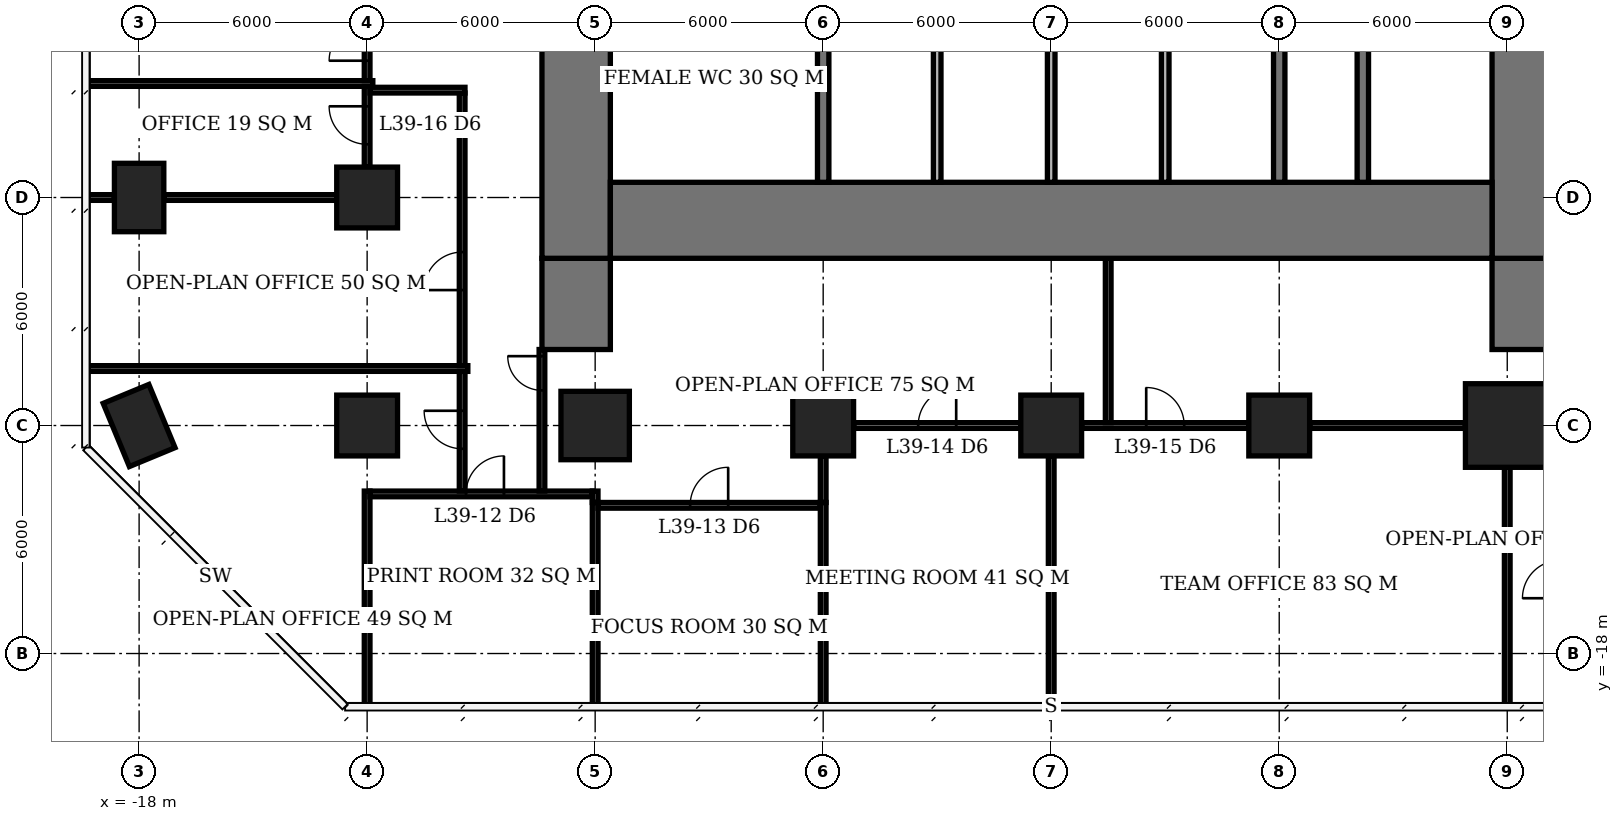
"""IFC4 building model, lengths in metres.
Left out: names, types, materials, properties, quantities, classifications, styles, units other than length and angle.
Written with IfcOpenShell. Run it as: python <this file> out.ifc"""

import sys

from ifc_helpers import new_model, si_unit, direction, frame, frame_2d, origin, origin_2d, place, context, subcontext, project, spatial, rectangle, extrude, element, fill, save


model = new_model("IFC4")
c1 = context("Model", 3, precision=1e-05, world=origin(), true_north=direction((0.0, 1.0)))
c2 = subcontext(c1, "Body", "Model", "MODEL_VIEW")
j1 = project(units=[si_unit("LENGTHUNIT", "METRE"), si_unit("PLANEANGLEUNIT", "RADIAN")], contexts=[c1])
p1 = place(None, origin())
s1 = spatial("IfcSite", under=j1, at=p1, CompositionType="ELEMENT")
p2 = place(p1, origin())
s2 = spatial("IfcBuilding", under=s1, at=p2, CompositionType="ELEMENT")
p3 = place(p2, frame((0.0, 0.0, 160.1)))
s3 = spatial("IfcBuildingStorey", under=s2, at=p3, CompositionType="ELEMENT", Elevation=160.1)
for number, where, z_axis, x_axis in (
    (1, (-18.0, -12.0, 0.0), (0.0, 0.0, 1.0), (-0.383, 0.924, 0.0)),
    (2, (-18.0, -6.0, 0.0), (0.0, 0.0, 1.0), (0.0, 1.0, 0.0)),
):
    element("IfcColumn", number, at=place(p3, frame(where, z_axis=z_axis, x_axis=x_axis)), inside=s3, PredefinedType="COLUMN", context=c2, shape_type="SweptSolid", body=[
        extrude(rectangle(XDim=1.8, YDim=1.3, at=origin_2d()), origin(), (0.0, 0.0, 1.0), 3.9),
    ])
for number, where, z_axis, x_axis in (
    (3, (-12.0, -12.0, 0.0), (0.0, 0.0, 1.0), (1.0, 0.0, 0.0)),
    (4, (-12.0, -6.0, 0.0), (0.0, 0.0, 1.0), (1.0, 0.0, 0.0)),
):
    element("IfcColumn", number, at=place(p3, frame(where, z_axis=z_axis, x_axis=x_axis)), inside=s3, PredefinedType="COLUMN", context=c2, shape_type="SweptSolid", body=[
        extrude(rectangle(XDim=1.6, YDim=1.6, at=origin_2d()), origin(), (0.0, 0.0, 1.0), 3.9),
    ])
p4 = place(p3, frame((-6.0, -12.0, 0.0), z_axis=(0.0, 0.0, 1.0), x_axis=(1.0, 0.0, 0.0)))
e5 = element("IfcColumn", 5, at=p4, inside=s3, PredefinedType="COLUMN", context=c2, shape_type="SweptSolid", body=[
    extrude(rectangle(XDim=1.8, YDim=1.8, at=origin_2d()), origin(), (0.0, 0.0, 1.0), 3.9),
])
for number, where, z_axis, x_axis in (
    (6, (0.0, -12.0, 0.0), (0.0, 0.0, 1.0), (1.0, 0.0, 0.0)),
    (7, (6.0, -12.0, 0.0), (0.0, 0.0, 1.0), (1.0, 0.0, 0.0)),
    (8, (12.0, -12.0, 0.0), (0.0, 0.0, 1.0), (1.0, 0.0, 0.0)),
):
    element("IfcColumn", number, at=place(p3, frame(where, z_axis=z_axis, x_axis=x_axis)), inside=s3, PredefinedType="COLUMN", context=c2, shape_type="SweptSolid", body=[
        extrude(rectangle(XDim=1.6, YDim=1.6, at=origin_2d()), origin(), (0.0, 0.0, 1.0), 3.9),
    ])
p5 = place(p3, frame((18.0, -12.0, 0.0), z_axis=(0.0, 0.0, 1.0), x_axis=(1.0, 0.0, 0.0)))
e9 = element("IfcColumn", 9, at=p5, inside=s3, PredefinedType="COLUMN", context=c2, shape_type="SweptSolid", body=[
    extrude(rectangle(XDim=2.2, YDim=2.2, at=origin_2d()), origin(), (0.0, 0.0, 1.0), 3.9),
])
p6 = place(p3, frame((-5.6, -6.6, 0.0), z_axis=(0.0, 0.0, 1.0), x_axis=(1.0, 0.0, 0.0)))
e10 = element("IfcWall", 10, at=p6, inside=s3, PredefinedType="SHEAR", context=c2, shape_type="SweptSolid", body=[
    extrude(rectangle(XDim=23.2, YDim=2.0, at=frame_2d((11.6, 0.0))), origin(), (0.0, 0.0, 1.0), 3.9),
])
p7 = place(p3, frame((-6.5, -7.6, 0.0), z_axis=(0.0, 0.0, 1.0), x_axis=(0.0, 1.0, 0.0)))
e11 = element("IfcWall", 11, at=p7, inside=s3, PredefinedType="SHEAR", context=c2, shape_type="SweptSolid", body=[
    extrude(rectangle(XDim=21.2, YDim=1.8, at=frame_2d((10.6, 0.0))), origin(), (0.0, 0.0, 1.0), 3.9),
])
p8 = place(p7, frame((7.8, 0.0, 0.0)))
e12 = element("IfcOpeningElement", 12, at=p8, cuts=e11, PredefinedType="OPENING", context=c2, shape_type="SweptSolid", body=[
    extrude(rectangle(XDim=1.8, YDim=2.4, at=frame_2d((0.9, 1.2))), frame((0.0, 0.91, 0.0), z_axis=(0.0, -1.0, 0.0), x_axis=(1.0, 0.0, 0.0)), (0.0, 0.0, 1.0), 1.82),
])
p9 = place(p3, frame((18.5, -7.6, 0.0), z_axis=(0.0, 0.0, 1.0), x_axis=(0.0, 1.0, 0.0)))
e13 = element("IfcWall", 13, at=p9, inside=s3, PredefinedType="SHEAR", context=c2, shape_type="SweptSolid", body=[
    extrude(rectangle(XDim=21.2, YDim=1.8, at=frame_2d((10.6, 0.0))), origin(), (0.0, 0.0, 1.0), 3.9),
])
p10 = place(p9, frame((9.2, 0.0, 0.0)))
e14 = element("IfcOpeningElement", 14, at=p10, cuts=e13, PredefinedType="OPENING", context=c2, shape_type="SweptSolid", body=[
    extrude(rectangle(XDim=1.8, YDim=2.4, at=frame_2d((0.9, 1.2))), frame((0.0, 0.91, 0.0), z_axis=(0.0, -1.0, 0.0), x_axis=(1.0, 0.0, 0.0)), (0.0, 0.0, 1.0), 1.82),
])
for number, where, z_axis, x_axis in (
    (15, (-6.5, -10.0, 0.0), (0.0, 0.0, 1.0), (0.0, 1.0, 0.0)),
    (16, (18.5, -10.0, 0.0), (0.0, 0.0, 1.0), (0.0, 1.0, 0.0)),
):
    element("IfcWall", number, at=place(p3, frame(where, z_axis=z_axis, x_axis=x_axis)), inside=s3, PredefinedType="SHEAR", context=c2, shape_type="SweptSolid", body=[
        extrude(rectangle(XDim=2.4, YDim=1.8, at=frame_2d((1.2, 0.0))), origin(), (0.0, 0.0, 1.0), 3.9),
    ])
for number, where, z_axis, x_axis in (
    (17, (0.0, -5.6, 0.0), (0.0, 0.0, 1.0), (0.0, 1.0, 0.0)),
    (18, (12.0, -5.6, 0.0), (0.0, 0.0, 1.0), (0.0, 1.0, 0.0)),
):
    element("IfcWall", number, at=place(p3, frame(where, z_axis=z_axis, x_axis=x_axis)), inside=s3, PredefinedType="SHEAR", context=c2, shape_type="SweptSolid", body=[
        extrude(rectangle(XDim=5.45, YDim=0.3, at=frame_2d((2.725, 0.0))), origin(), (0.0, 0.0, 1.0), 3.9),
    ])
p11 = place(p3, frame((14.2, -5.6, 0.0), z_axis=(0.0, 0.0, 1.0), x_axis=(0.0, 1.0, 0.0)))
e19 = element("IfcWall", 19, at=p11, inside=s3, PredefinedType="SHEAR", context=c2, shape_type="SweptSolid", body=[
    extrude(rectangle(XDim=8.45, YDim=0.3, at=frame_2d((4.225, 0.0))), origin(), (0.0, 0.0, 1.0), 3.9),
])
for number, where, z_axis, x_axis in (
    (20, (3.0, -5.6, 0.0), (0.0, 0.0, 1.0), (0.0, 1.0, 0.0)),
    (21, (6.0, -5.6, 0.0), (0.0, 0.0, 1.0), (0.0, 1.0, 0.0)),
    (22, (9.0, -5.6, 0.0), (0.0, 0.0, 1.0), (0.0, 1.0, 0.0)),
):
    element("IfcWall", number, at=place(p3, frame(where, z_axis=z_axis, x_axis=x_axis)), inside=s3, PredefinedType="SOLIDWALL", context=c2, shape_type="SweptSolid", body=[
        extrude(rectangle(XDim=5.45, YDim=0.2, at=frame_2d((2.725, 0.0))), origin(), (0.0, 0.0, 1.0), 3.9),
    ])
p12 = place(p3, frame((-5.925, -14.1, 0.0), z_axis=(0.0, 0.0, 1.0), x_axis=(1.0, 0.0, 0.0)))
e23 = element("IfcWall", 23, at=p12, inside=s3, PredefinedType="PARTITIONING", context=c2, shape_type="SweptSolid", body=[
    extrude(rectangle(XDim=5.85, YDim=0.15, at=frame_2d((2.925, 0.0))), origin(), (0.0, 0.0, 1.0), 3.65),
])
p13 = place(p12, frame((2.425, 0.0, 0.0)))
e24 = element("IfcOpeningElement", 24, at=p13, cuts=e23, PredefinedType="OPENING", context=c2, shape_type="SweptSolid", body=[
    extrude(rectangle(XDim=1.0, YDim=2.1, at=frame_2d((0.5, 1.05))), frame((0.0, 0.085, 0.0), z_axis=(0.0, -1.0, 0.0), x_axis=(1.0, 0.0, 0.0)), (0.0, 0.0, 1.0), 0.17),
])
p14 = place(p3, frame((-11.925, -13.8, 0.0), z_axis=(0.0, 0.0, 1.0), x_axis=(1.0, 0.0, 0.0)))
e25 = element("IfcWall", 25, at=p14, inside=s3, PredefinedType="PARTITIONING", context=c2, shape_type="SweptSolid", body=[
    extrude(rectangle(XDim=5.85, YDim=0.15, at=frame_2d((2.925, 0.0))), origin(), (0.0, 0.0, 1.0), 3.65),
])
p15 = place(p14, frame((2.525, 0.0, 0.0)))
e26 = element("IfcOpeningElement", 26, at=p15, cuts=e25, PredefinedType="OPENING", context=c2, shape_type="SweptSolid", body=[
    extrude(rectangle(XDim=1.0, YDim=2.1, at=frame_2d((0.5, 1.05))), frame((0.0, 0.085, 0.0), z_axis=(0.0, -1.0, 0.0), x_axis=(1.0, 0.0, 0.0)), (0.0, 0.0, 1.0), 0.17),
])
p16 = place(p3, frame((0.8, -12.0, 0.0), z_axis=(0.0, 0.0, 1.0), x_axis=(1.0, 0.0, 0.0)))
e27 = element("IfcWall", 27, at=p16, inside=s3, PredefinedType="PARTITIONING", context=c2, shape_type="SweptSolid", body=[
    extrude(rectangle(XDim=4.4, YDim=0.15, at=frame_2d((2.2, 0.0))), origin(), (0.0, 0.0, 1.0), 3.65),
])
p17 = place(p16, frame((1.7, 0.0, 0.0)))
e28 = element("IfcOpeningElement", 28, at=p17, cuts=e27, PredefinedType="OPENING", context=c2, shape_type="SweptSolid", body=[
    extrude(rectangle(XDim=1.0, YDim=2.1, at=frame_2d((0.5, 1.05))), frame((0.0, 0.085, 0.0), z_axis=(0.0, -1.0, 0.0), x_axis=(1.0, 0.0, 0.0)), (0.0, 0.0, 1.0), 0.17),
])
p18 = place(p3, frame((6.8, -12.0, 0.0), z_axis=(0.0, 0.0, 1.0), x_axis=(1.0, 0.0, 0.0)))
e29 = element("IfcWall", 29, at=p18, inside=s3, PredefinedType="PARTITIONING", context=c2, shape_type="SweptSolid", body=[
    extrude(rectangle(XDim=4.4, YDim=0.15, at=frame_2d((2.2, 0.0))), origin(), (0.0, 0.0, 1.0), 3.65),
])
p19 = place(p18, frame((1.7, 0.0, 0.0)))
e30 = element("IfcOpeningElement", 30, at=p19, cuts=e29, PredefinedType="OPENING", context=c2, shape_type="SweptSolid", body=[
    extrude(rectangle(XDim=1.0, YDim=2.1, at=frame_2d((0.5, 1.05))), frame((0.0, 0.085, 0.0), z_axis=(0.0, -1.0, 0.0), x_axis=(1.0, 0.0, 0.0)), (0.0, 0.0, 1.0), 0.17),
])
p20 = place(p3, frame((12.8, -12.0, 0.0), z_axis=(0.0, 0.0, 1.0), x_axis=(1.0, 0.0, 0.0)))
e31 = element("IfcWall", 31, at=p20, inside=s3, PredefinedType="PARTITIONING", context=c2, shape_type="SweptSolid", body=[
    extrude(rectangle(XDim=4.1, YDim=0.15, at=frame_2d((2.05, 0.0))), origin(), (0.0, 0.0, 1.0), 3.65),
])
p21 = place(p3, frame((-19.4, -6.0, 0.0), z_axis=(0.0, 0.0, 1.0), x_axis=(1.0, 0.0, 0.0)))
e32 = element("IfcWall", 32, at=p21, inside=s3, PredefinedType="PARTITIONING", context=c2, shape_type="SweptSolid", body=[
    extrude(rectangle(XDim=0.75, YDim=0.15, at=frame_2d((0.375, 0.0))), origin(), (0.0, 0.0, 1.0), 3.65),
])
p22 = place(p3, frame((-17.35, -6.0, 0.0), z_axis=(0.0, 0.0, 1.0), x_axis=(1.0, 0.0, 0.0)))
e33 = element("IfcWall", 33, at=p22, inside=s3, PredefinedType="PARTITIONING", context=c2, shape_type="SweptSolid", body=[
    extrude(rectangle(XDim=4.55, YDim=0.15, at=frame_2d((2.275, 0.0))), origin(), (0.0, 0.0, 1.0), 3.65),
])
p23 = place(p3, frame((-19.4, -3.0, 0.0), z_axis=(0.0, 0.0, 1.0), x_axis=(1.0, 0.0, 0.0)))
e34 = element("IfcWall", 34, at=p23, inside=s3, PredefinedType="PARTITIONING", context=c2, shape_type="SweptSolid", body=[
    extrude(rectangle(XDim=7.55, YDim=0.15, at=frame_2d((3.775, 0.0))), origin(), (0.0, 0.0, 1.0), 3.65),
])
p24 = place(p3, frame((-12.0, -19.4, 0.0), z_axis=(0.0, 0.0, 1.0), x_axis=(0.0, 1.0, 0.0)))
e35 = element("IfcWall", 35, at=p24, inside=s3, PredefinedType="PARTITIONING", context=c2, shape_type="SweptSolid", body=[
    extrude(rectangle(XDim=5.675, YDim=0.15, at=frame_2d((2.837, 0.0))), origin(), (0.0, 0.0, 1.0), 3.65),
])
p25 = place(p3, frame((-12.0, -5.2, 0.0), z_axis=(0.0, 0.0, 1.0), x_axis=(0.0, 1.0, 0.0)))
e36 = element("IfcWall", 36, at=p25, inside=s3, PredefinedType="PARTITIONING", context=c2, shape_type="SweptSolid", body=[
    extrude(rectangle(XDim=2.125, YDim=0.15, at=frame_2d((1.062, 0.0))), origin(), (0.0, 0.0, 1.0), 3.65),
])
p26 = place(p25, frame((0.6, 0.0, 0.0)))
e37 = element("IfcOpeningElement", 37, at=p26, cuts=e36, PredefinedType="OPENING", context=c2, shape_type="SweptSolid", body=[
    extrude(rectangle(XDim=1.0, YDim=2.1, at=frame_2d((0.5, 1.05))), frame((0.0, 0.085, 0.0), z_axis=(0.0, -1.0, 0.0), x_axis=(1.0, 0.0, 0.0)), (0.0, 0.0, 1.0), 0.17),
])
p27 = place(p3, frame((-12.0, -2.925, 0.0), z_axis=(0.0, 0.0, 1.0), x_axis=(0.0, 1.0, 0.0)))
e38 = element("IfcWall", 38, at=p27, inside=s3, PredefinedType="PARTITIONING", context=c2, shape_type="SweptSolid", body=[
    extrude(rectangle(XDim=2.125, YDim=0.15, at=frame_2d((1.062, 0.0))), origin(), (0.0, 0.0, 1.0), 3.65),
])
p28 = place(p27, frame((0.525, 0.0, 0.0)))
e39 = element("IfcOpeningElement", 39, at=p28, cuts=e38, PredefinedType="OPENING", context=c2, shape_type="SweptSolid", body=[
    extrude(rectangle(XDim=1.0, YDim=2.1, at=frame_2d((0.5, 1.05))), frame((0.0, 0.085, 0.0), z_axis=(0.0, -1.0, 0.0), x_axis=(1.0, 0.0, 0.0)), (0.0, 0.0, 1.0), 0.17),
])
p29 = place(p3, frame((-6.0, -19.4, 0.0), z_axis=(0.0, 0.0, 1.0), x_axis=(0.0, 1.0, 0.0)))
e40 = element("IfcWall", 40, at=p29, inside=s3, PredefinedType="PARTITIONING", context=c2, shape_type="SweptSolid", body=[
    extrude(rectangle(XDim=5.375, YDim=0.15, at=frame_2d((2.688, 0.0))), origin(), (0.0, 0.0, 1.0), 3.65),
])
p30 = place(p3, frame((-6.0, -14.025, 0.0), z_axis=(0.0, 0.0, 1.0), x_axis=(0.0, 1.0, 0.0)))
e41 = element("IfcWall", 41, at=p30, inside=s3, PredefinedType="PARTITIONING", context=c2, shape_type="SweptSolid", body=[
    extrude(rectangle(XDim=0.3, YDim=0.15, at=frame_2d((0.15, 0.0))), origin(), (0.0, 0.0, 1.0), 3.65),
])
p31 = place(p3, frame((0.0, -19.4, 0.0), z_axis=(0.0, 0.0, 1.0), x_axis=(0.0, 1.0, 0.0)))
e42 = element("IfcWall", 42, at=p31, inside=s3, PredefinedType="PARTITIONING", context=c2, shape_type="SweptSolid", body=[
    extrude(rectangle(XDim=5.375, YDim=0.15, at=frame_2d((2.688, 0.0))), origin(), (0.0, 0.0, 1.0), 3.65),
])
p32 = place(p3, frame((0.0, -14.025, 0.0), z_axis=(0.0, 0.0, 1.0), x_axis=(0.0, 1.0, 0.0)))
e43 = element("IfcWall", 43, at=p32, inside=s3, PredefinedType="PARTITIONING", context=c2, shape_type="SweptSolid", body=[
    extrude(rectangle(XDim=1.225, YDim=0.15, at=frame_2d((0.612, 0.0))), origin(), (0.0, 0.0, 1.0), 3.65),
])
p33 = place(p3, frame((6.0, -19.35, 0.0), z_axis=(0.0, 0.0, 1.0), x_axis=(0.0, 1.0, 0.0)))
e44 = element("IfcWall", 44, at=p33, inside=s3, PredefinedType="PARTITIONING", context=c2, shape_type="SweptSolid", body=[
    extrude(rectangle(XDim=6.55, YDim=0.15, at=frame_2d((3.275, 0.0))), origin(), (0.0, 0.0, 1.0), 3.65),
])
p34 = place(p3, frame((18.0, -19.4, 0.0), z_axis=(0.0, 0.0, 1.0), x_axis=(0.0, 1.0, 0.0)))
e45 = element("IfcWall", 45, at=p34, inside=s3, PredefinedType="PARTITIONING", context=c2, shape_type="SweptSolid", body=[
    extrude(rectangle(XDim=6.3, YDim=0.15, at=frame_2d((3.15, 0.0))), origin(), (0.0, 0.0, 1.0), 3.65),
])
p35 = place(p3, frame((-19.4, -10.5, 0.0), z_axis=(0.0, 0.0, 1.0), x_axis=(1.0, 0.0, 0.0)))
e46 = element("IfcWall", 46, at=p35, inside=s3, PredefinedType="PARTITIONING", context=c2, shape_type="SweptSolid", body=[
    extrude(rectangle(XDim=10.05, YDim=0.15, at=frame_2d((5.025, 0.0))), origin(), (0.0, 0.0, 1.0), 3.65),
])
p36 = place(p3, frame((-11.925, -3.175, 0.0), z_axis=(0.0, 0.0, 1.0), x_axis=(1.0, 0.0, 0.0)))
e47 = element("IfcWall", 47, at=p36, inside=s3, PredefinedType="PARTITIONING", context=c2, shape_type="SweptSolid", body=[
    extrude(rectangle(XDim=2.5, YDim=0.15, at=frame_2d((1.25, 0.0))), origin(), (0.0, 0.0, 1.0), 3.65),
])
p37 = place(p3, frame((-9.5, -13.725, 0.0), z_axis=(0.0, 0.0, 1.0), x_axis=(0.0, 1.0, 0.0)))
e48 = element("IfcWall", 48, at=p37, inside=s3, PredefinedType="PARTITIONING", context=c2, shape_type="SweptSolid", body=[
    extrude(rectangle(XDim=3.15, YDim=0.15, at=frame_2d((1.575, 0.0))), origin(), (0.0, 0.0, 1.0), 3.65),
])
p38 = place(p37, frame((1.113, 0.0, 0.0)))
e49 = element("IfcOpeningElement", 49, at=p38, cuts=e48, PredefinedType="OPENING", context=c2, shape_type="SweptSolid", body=[
    extrude(rectangle(XDim=1.0, YDim=2.1, at=frame_2d((0.5, 1.05))), frame((0.0, 0.085, 0.0), z_axis=(0.0, -1.0, 0.0), x_axis=(1.0, 0.0, 0.0)), (0.0, 0.0, 1.0), 0.17),
])
p39 = place(p3, frame((-9.5, -10.425, 0.0), z_axis=(0.0, 0.0, 1.0), x_axis=(0.0, 1.0, 0.0)))
e50 = element("IfcWall", 50, at=p39, inside=s3, PredefinedType="PARTITIONING", context=c2, shape_type="SweptSolid", body=[
    extrude(rectangle(XDim=7.175, YDim=0.15, at=frame_2d((3.587, 0.0))), origin(), (0.0, 0.0, 1.0), 3.65),
])
p40 = place(p39, frame((1.989, 0.0, 0.0)))
e51 = element("IfcOpeningElement", 51, at=p40, cuts=e50, PredefinedType="OPENING", context=c2, shape_type="SweptSolid", body=[
    extrude(rectangle(XDim=1.0, YDim=2.1, at=frame_2d((0.5, 1.05))), frame((0.0, 0.085, 0.0), z_axis=(0.0, -1.0, 0.0), x_axis=(1.0, 0.0, 0.0)), (0.0, 0.0, 1.0), 0.17),
])
p41 = place(p3, frame((-7.4, -13.725, 0.0), z_axis=(0.0, 0.0, 1.0), x_axis=(0.0, 1.0, 0.0)))
e52 = element("IfcWall", 52, at=p41, inside=s3, PredefinedType="PARTITIONING", context=c2, shape_type="SweptSolid", body=[
    extrude(rectangle(XDim=3.725, YDim=0.15, at=frame_2d((1.863, 0.0))), origin(), (0.0, 0.0, 1.0), 3.65),
])
p42 = place(p41, frame((2.65, 0.0, 0.0)))
e53 = element("IfcOpeningElement", 53, at=p42, cuts=e52, PredefinedType="OPENING", context=c2, shape_type="SweptSolid", body=[
    extrude(rectangle(XDim=0.9, YDim=2.1, at=frame_2d((0.45, 1.05))), frame((0.0, 0.085, 0.0), z_axis=(0.0, -1.0, 0.0), x_axis=(1.0, 0.0, 0.0)), (0.0, 0.0, 1.0), 0.17),
])
p43 = place(p3, frame((7.5, -11.925, 0.0), z_axis=(0.0, 0.0, 1.0), x_axis=(0.0, 1.0, 0.0)))
e54 = element("IfcWall", 54, at=p43, inside=s3, PredefinedType="PARTITIONING", context=c2, shape_type="SweptSolid", body=[
    extrude(rectangle(XDim=4.325, YDim=0.15, at=frame_2d((2.163, 0.0))), origin(), (0.0, 0.0, 1.0), 3.65),
])
p44 = place(p15, origin())
e55 = element("IfcDoor", 55, at=p44, inside=s3, OperationType="SINGLE_SWING_RIGHT", PredefinedType="DOOR", context=c2, shape_type="SweptSolid", body=[
    extrude(rectangle(XDim=1.0, YDim=2.1, at=frame_2d((0.5, 1.05))), frame((0.0, 0.025, 0.0), z_axis=(0.0, -1.0, 0.0), x_axis=(1.0, 0.0, 0.0)), (0.0, 0.0, 1.0), 0.05),
])
fill(e26, e55)
p45 = place(p13, origin())
e56 = element("IfcDoor", 56, at=p45, inside=s3, OperationType="SINGLE_SWING_RIGHT", PredefinedType="DOOR", context=c2, shape_type="SweptSolid", body=[
    extrude(rectangle(XDim=1.0, YDim=2.1, at=frame_2d((0.5, 1.05))), frame((0.0, 0.025, 0.0), z_axis=(0.0, -1.0, 0.0), x_axis=(1.0, 0.0, 0.0)), (0.0, 0.0, 1.0), 0.05),
])
fill(e24, e56)
p46 = place(p17, origin())
e57 = element("IfcDoor", 57, at=p46, inside=s3, OperationType="SINGLE_SWING_RIGHT", PredefinedType="DOOR", context=c2, shape_type="SweptSolid", body=[
    extrude(rectangle(XDim=1.0, YDim=2.1, at=frame_2d((0.5, 1.05))), frame((0.0, 0.025, 0.0), z_axis=(0.0, -1.0, 0.0), x_axis=(1.0, 0.0, 0.0)), (0.0, 0.0, 1.0), 0.05),
])
fill(e28, e57)
p47 = place(p19, origin())
e58 = element("IfcDoor", 58, at=p47, inside=s3, OperationType="SINGLE_SWING_LEFT", PredefinedType="DOOR", context=c2, shape_type="SweptSolid", body=[
    extrude(rectangle(XDim=1.0, YDim=2.1, at=frame_2d((0.5, 1.05))), frame((0.0, 0.025, 0.0), z_axis=(0.0, -1.0, 0.0), x_axis=(1.0, 0.0, 0.0)), (0.0, 0.0, 1.0), 0.05),
])
fill(e30, e58)
p48 = place(p26, origin())
e59 = element("IfcDoor", 59, at=p48, inside=s3, OperationType="SINGLE_SWING_RIGHT", PredefinedType="DOOR", context=c2, shape_type="SweptSolid", body=[
    extrude(rectangle(XDim=1.0, YDim=2.1, at=frame_2d((0.5, 1.05))), frame((0.0, 0.025, 0.0), z_axis=(0.0, -1.0, 0.0), x_axis=(1.0, 0.0, 0.0)), (0.0, 0.0, 1.0), 0.05),
])
fill(e37, e59)
p49 = place(p28, origin())
e60 = element("IfcDoor", 60, at=p49, inside=s3, OperationType="SINGLE_SWING_LEFT", PredefinedType="DOOR", context=c2, shape_type="SweptSolid", body=[
    extrude(rectangle(XDim=1.0, YDim=2.1, at=frame_2d((0.5, 1.05))), frame((0.0, 0.025, 0.0), z_axis=(0.0, -1.0, 0.0), x_axis=(1.0, 0.0, 0.0)), (0.0, 0.0, 1.0), 0.05),
])
fill(e39, e60)
p50 = place(p38, origin())
e61 = element("IfcDoor", 61, at=p50, inside=s3, OperationType="SINGLE_SWING_RIGHT", PredefinedType="DOOR", context=c2, shape_type="SweptSolid", body=[
    extrude(rectangle(XDim=1.0, YDim=2.1, at=frame_2d((0.5, 1.05))), frame((0.0, 0.025, 0.0), z_axis=(0.0, -1.0, 0.0), x_axis=(1.0, 0.0, 0.0)), (0.0, 0.0, 1.0), 0.05),
])
fill(e49, e61)
p51 = place(p40, origin())
e62 = element("IfcDoor", 62, at=p51, inside=s3, OperationType="SINGLE_SWING_LEFT", PredefinedType="DOOR", context=c2, shape_type="SweptSolid", body=[
    extrude(rectangle(XDim=1.0, YDim=2.1, at=frame_2d((0.5, 1.05))), frame((0.0, 0.025, 0.0), z_axis=(0.0, -1.0, 0.0), x_axis=(1.0, 0.0, 0.0)), (0.0, 0.0, 1.0), 0.05),
])
fill(e51, e62)
p52 = place(p42, origin())
e63 = element("IfcDoor", 63, at=p52, inside=s3, OperationType="SINGLE_SWING_RIGHT", PredefinedType="DOOR", context=c2, shape_type="SweptSolid", body=[
    extrude(rectangle(XDim=0.9, YDim=2.1, at=frame_2d((0.45, 1.05))), frame((0.0, 0.025, 0.0), z_axis=(0.0, -1.0, 0.0), x_axis=(1.0, 0.0, 0.0)), (0.0, 0.0, 1.0), 0.05),
])
fill(e53, e63)
save(model, sys.argv[1])
